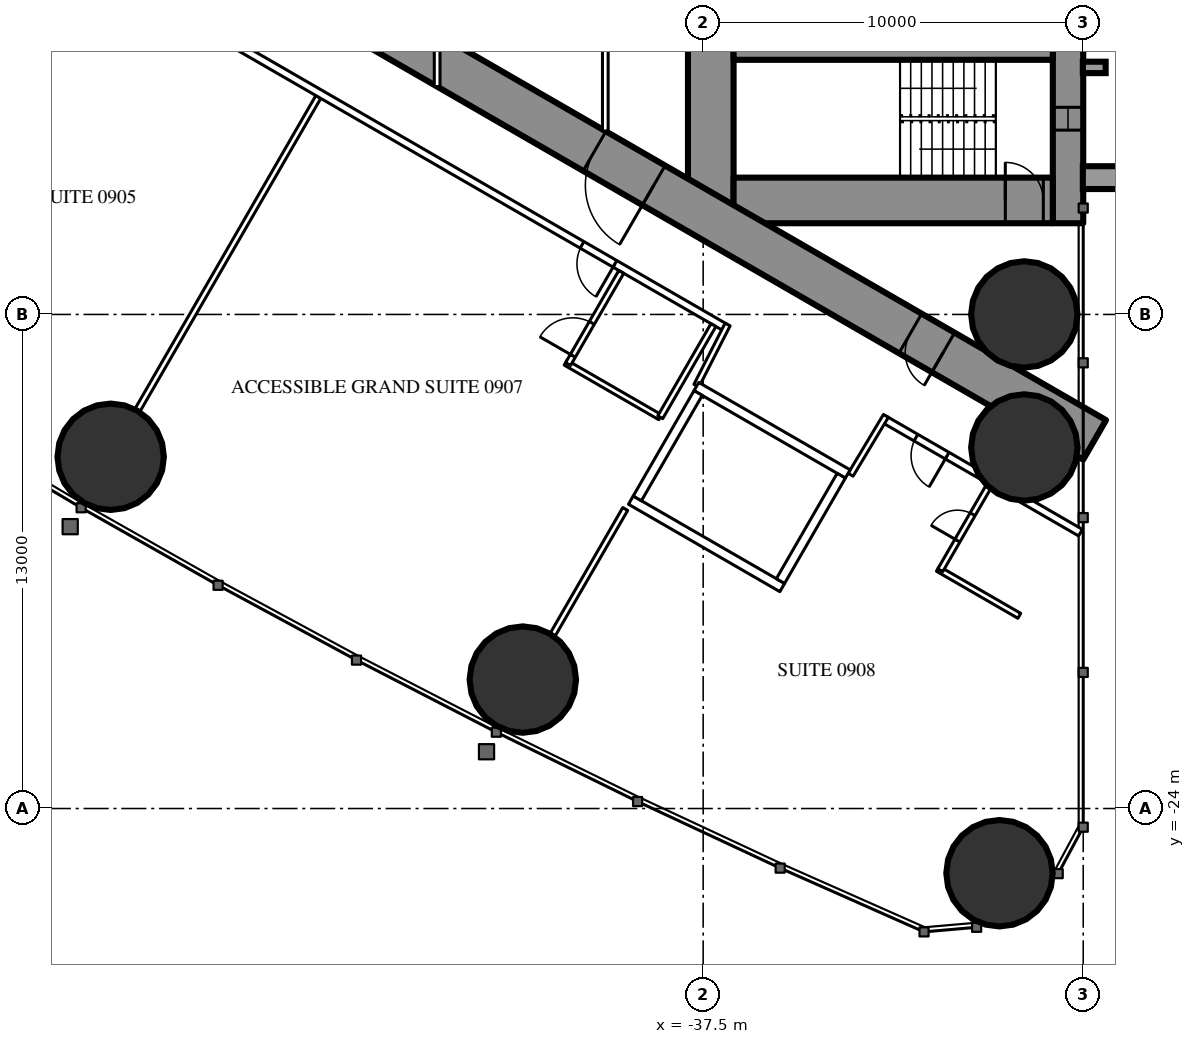
"""IFC4 building model, lengths in metres.
Left out: names, types, materials, properties, quantities, classifications, styles, units other than length and angle.
Written with IfcOpenShell. Run it as: python <this file> out.ifc"""

import sys

from ifc_helpers import new_model, si_unit, direction, frame, frame_2d, origin, origin_2d, place, context, subcontext, project, spatial, rectangle, hollow_circle, extrude, element, fill, save


model = new_model("IFC4")
c1 = context("Model", 3, precision=1e-05, world=origin(), true_north=direction((0.0, 1.0)))
c2 = subcontext(c1, "Body", "Model", "MODEL_VIEW")
j1 = project(units=[si_unit("LENGTHUNIT", "METRE"), si_unit("PLANEANGLEUNIT", "RADIAN")], contexts=[c1])
p1 = place(None, origin())
s1 = spatial("IfcSite", under=j1, at=p1, CompositionType="ELEMENT")
p2 = place(p1, origin())
s2 = spatial("IfcBuilding", under=s1, at=p2, CompositionType="ELEMENT")
p3 = place(p2, frame((0.0, 0.0, 39.0)))
s3 = spatial("IfcBuildingStorey", under=s2, at=p3, CompositionType="ELEMENT", Elevation=39.0)
for number, where, z_axis, x_axis in (
    (1, (-29.703, -25.703, 0.0), (0.0, 0.0, 1.0), (1.0, 0.0, 0.0)),
    (2, (-29.05, -11.0, 0.0), (0.0, 0.0, 1.0), (1.0, 0.0, 0.0)),
    (3, (-29.05, -14.5, 0.0), (0.0, 0.0, 1.0), (1.0, 0.0, 0.0)),
    (4, (-53.09, -14.745, 0.0), (0.0, 0.0, 1.0), (1.0, 0.0, 0.0)),
    (5, (-42.245, -20.607, 0.0), (0.0, 0.0, 1.0), (1.0, 0.0, 0.0)),
):
    element("IfcColumn", number, at=place(p3, frame(where, z_axis=z_axis, x_axis=x_axis)), inside=s3, PredefinedType="COLUMN", context=c2, shape_type="SweptSolid", body=[
        extrude(hollow_circle(Radius=1.4, WallThickness=0.12, at=origin_2d()), origin(), (0.0, 0.0, 1.0), 3.5),
    ])
p4 = place(p3, frame((-27.9, 8.6, 0.0), z_axis=(0.0, 0.0, 1.0), x_axis=(0.0, -1.0, 0.0)))
e6 = element("IfcWall", 6, at=p4, inside=s3, PredefinedType="SHEAR", context=c2, shape_type="SweptSolid", body=[
    extrude(rectangle(XDim=17.2, YDim=0.8, at=frame_2d((8.6, 0.0))), origin(), (0.0, 0.0, 1.0), 3.5),
])
p5 = place(p4, frame((2.45, 0.0, 0.6)))
e7 = element("IfcOpeningElement", 7, at=p5, cuts=e6, PredefinedType="OPENING", context=c2, shape_type="SweptSolid", body=[
    extrude(rectangle(XDim=0.6, YDim=2.1, at=frame_2d((0.3, 1.05))), frame((0.0, 0.41, 0.0), z_axis=(0.0, -1.0, 0.0), x_axis=(1.0, 0.0, 0.0)), (0.0, 0.0, 1.0), 0.82),
])
p6 = place(p4, frame((14.15, 0.0, 0.6)))
e8 = element("IfcOpeningElement", 8, at=p6, cuts=e6, PredefinedType="OPENING", context=c2, shape_type="SweptSolid", body=[
    extrude(rectangle(XDim=0.6, YDim=2.1, at=frame_2d((0.3, 1.05))), frame((0.0, 0.41, 0.0), z_axis=(0.0, -1.0, 0.0), x_axis=(1.0, 0.0, 0.0)), (0.0, 0.0, 1.0), 0.82),
])
p7 = place(p3, frame((-37.3, 8.6, 0.0), z_axis=(0.0, 0.0, 1.0), x_axis=(0.0, -1.0, 0.0)))
e9 = element("IfcWall", 9, at=p7, inside=s3, PredefinedType="SHEAR", context=c2, shape_type="SweptSolid", body=[
    extrude(rectangle(XDim=17.2, YDim=1.2, at=frame_2d((8.6, 0.0))), origin(), (0.0, 0.0, 1.0), 3.5),
])
p8 = place(p7, frame((7.7, 0.0, 0.0)))
e10 = element("IfcOpeningElement", 10, at=p8, cuts=e9, PredefinedType="OPENING", context=c2, shape_type="SweptSolid", body=[
    extrude(rectangle(XDim=1.8, YDim=2.2, at=frame_2d((0.9, 1.1))), frame((0.0, 0.61, 0.0), z_axis=(0.0, -1.0, 0.0), x_axis=(1.0, 0.0, 0.0)), (0.0, 0.0, 1.0), 1.22),
])
p9 = place(p3, frame((-28.3, -8.0, 0.0), z_axis=(0.0, 0.0, 1.0), x_axis=(-1.0, 0.0, 0.0)))
e11 = element("IfcWall", 11, at=p9, inside=s3, PredefinedType="SHEAR", context=c2, shape_type="SweptSolid", body=[
    extrude(rectangle(XDim=8.4, YDim=1.2, at=frame_2d((4.2, 0.0))), origin(), (0.0, 0.0, 1.0), 3.5),
])
p10 = place(p9, frame((0.25, 0.0, 0.0)))
e12 = element("IfcOpeningElement", 12, at=p10, cuts=e11, PredefinedType="OPENING", context=c2, shape_type="SweptSolid", body=[
    extrude(rectangle(XDim=1.0, YDim=2.2, at=frame_2d((0.5, 1.1))), frame((0.0, 0.61, 0.0), z_axis=(0.0, -1.0, 0.0), x_axis=(1.0, 0.0, 0.0)), (0.0, 0.0, 1.0), 1.22),
])
p11 = place(p3, frame((-28.3, -4.15, 0.0), z_axis=(0.0, 0.0, 1.0), x_axis=(-1.0, 0.0, 0.0)))
e13 = element("IfcWall", 13, at=p11, inside=s3, PredefinedType="SHEAR", context=c2, shape_type="SweptSolid", body=[
    extrude(rectangle(XDim=8.4, YDim=0.3, at=frame_2d((4.2, 0.0))), origin(), (0.0, 0.0, 1.0), 3.5),
])
p12 = place(p3, frame((-27.2, -14.3, 0.0), z_axis=(0.0, 0.0, 1.0), x_axis=(-0.866024021859, 0.500002393557, 0.0)))
e14 = element("IfcWall", 14, at=p12, inside=s3, PredefinedType="SHEAR", context=c2, shape_type="SweptSolid", body=[
    extrude(rectangle(XDim=27.907, YDim=1.2, at=frame_2d((13.954, 0.0))), origin(), (0.0, 0.0, 1.0), 3.5),
])
p13 = place(p12, frame((4.6, 0.0, 0.0)))
e15 = element("IfcOpeningElement", 15, at=p13, cuts=e14, PredefinedType="OPENING", context=c2, shape_type="SweptSolid", body=[
    extrude(rectangle(XDim=1.0, YDim=2.2, at=frame_2d((0.5, 1.1))), frame((0.0, 0.61, 0.0), z_axis=(0.0, -1.0, 0.0), x_axis=(1.0, 0.0, 0.0)), (0.0, 0.0, 1.0), 1.22),
])
p14 = place(p12, frame((13.395, 0.0, 0.0)))
e16 = element("IfcOpeningElement", 16, at=p14, cuts=e14, PredefinedType="OPENING", context=c2, shape_type="SweptSolid", body=[
    extrude(rectangle(XDim=1.8, YDim=2.2, at=frame_2d((0.9, 1.1))), frame((0.0, 0.61, 0.0), z_axis=(0.0, -1.0, 0.0), x_axis=(1.0, 0.0, 0.0)), (0.0, 0.0, 1.0), 1.22),
])
p15 = place(p3, frame((-47.627, -5.278, 0.0), z_axis=(0.0, 0.0, 1.0), x_axis=(-0.500009844318, -0.86601972009, 0.0)))
e17 = element("IfcWall", 17, at=p15, inside=s3, PredefinedType="PARTITIONING", context=c2, shape_type="SweptSolid", body=[
    extrude(rectangle(XDim=9.51, YDim=0.15, at=frame_2d((4.755, 0.0))), origin(), (0.0, 0.0, 1.0), 2.25),
])
p16 = place(p3, frame((-39.551, -16.118, 0.0), z_axis=(0.0, 0.0, 1.0), x_axis=(-0.499986503906, -0.866033195618, 0.0)))
e18 = element("IfcWall", 18, at=p16, inside=s3, PredefinedType="PARTITIONING", context=c2, shape_type="SweptSolid", body=[
    extrude(rectangle(XDim=3.815, YDim=0.15, at=frame_2d((1.907, 0.0))), origin(), (0.0, 0.0, 1.0), 3.25),
])
p17 = place(p3, frame((-27.572, -16.741, 0.0), z_axis=(0.0, 0.0, 1.0), x_axis=(-0.866024464444, 0.500001626982, 0.0)))
e19 = element("IfcWall", 19, at=p17, inside=s3, PredefinedType="PARTITIONING", context=c2, shape_type="SweptSolid", body=[
    extrude(rectangle(XDim=5.955, YDim=0.2, at=frame_2d((2.978, 0.0))), origin(), (0.0, 0.0, 1.0), 3.25),
])
p18 = place(p17, frame((4.05, 0.0, 0.0)))
e20 = element("IfcOpeningElement", 20, at=p18, cuts=e19, PredefinedType="OPENING", context=c2, shape_type="SweptSolid", body=[
    extrude(rectangle(XDim=0.95, YDim=2.2, at=frame_2d((0.475, 1.1))), frame((0.0, 0.11, 0.0), z_axis=(0.0, -1.0, 0.0), x_axis=(1.0, 0.0, 0.0)), (0.0, 0.0, 1.0), 0.22),
])
p19 = place(p3, frame((-36.92, -11.344, 0.0), z_axis=(0.0, 0.0, 1.0), x_axis=(-0.866028313256, 0.499994960614, 0.0)))
e21 = element("IfcWall", 21, at=p19, inside=s3, PredefinedType="PARTITIONING", context=c2, shape_type="SweptSolid", body=[
    extrude(rectangle(XDim=22.568, YDim=0.2, at=frame_2d((11.284, 0.0))), origin(), (0.0, 0.0, 1.0), 3.25),
])
p20 = place(p19, frame((21.018, 0.0, 0.0)))
e22 = element("IfcOpeningElement", 22, at=p20, cuts=e21, PredefinedType="OPENING", context=c2, shape_type="SweptSolid", body=[
    extrude(rectangle(XDim=0.95, YDim=2.2, at=frame_2d((0.475, 1.1))), frame((0.0, 0.11, 0.0), z_axis=(0.0, -1.0, 0.0), x_axis=(1.0, 0.0, 0.0)), (0.0, 0.0, 1.0), 0.22),
])
p21 = place(p19, frame((3.35, 0.0, 0.0)))
e23 = element("IfcOpeningElement", 23, at=p21, cuts=e21, PredefinedType="OPENING", context=c2, shape_type="SweptSolid", body=[
    extrude(rectangle(XDim=1.0, YDim=2.2, at=frame_2d((0.5, 1.1))), frame((0.0, 0.11, 0.0), z_axis=(0.0, -1.0, 0.0), x_axis=(1.0, 0.0, 0.0)), (0.0, 0.0, 1.0), 0.22),
])
p22 = place(p3, frame((-36.857, -11.265, 0.0), z_axis=(0.0, 0.0, 1.0), x_axis=(-0.454225294761, -0.890886851176, 0.0)))
e24 = element("IfcWall", 24, at=p22, inside=s3, PredefinedType="PARTITIONING", context=c2, shape_type="SweptSolid", body=[
    extrude(rectangle(XDim=1.807, YDim=0.15, at=frame_2d((0.904, 0.0))), origin(), (0.0, 0.0, 1.0), 3.25),
])
p23 = place(p3, frame((-33.621, -15.218, 0.0), z_axis=(0.0, 0.0, 1.0), x_axis=(0.514336634837, 0.857588377991, 0.0)))
e25 = element("IfcWall", 25, at=p23, inside=s3, PredefinedType="PARTITIONING", context=c2, shape_type="SweptSolid", body=[
    extrude(rectangle(XDim=1.805, YDim=0.15, at=frame_2d((0.903, 0.0))), origin(), (0.0, 0.0, 1.0), 3.25),
])
p24 = place(p3, frame((-38.63, -13.705, 0.0), z_axis=(0.0, 0.0, 1.0), x_axis=(-0.866018712932, 0.500011588718, 0.0)))
e26 = element("IfcWall", 26, at=p24, inside=s3, PredefinedType="PARTITIONING", context=c2, shape_type="SweptSolid", body=[
    extrude(rectangle(XDim=2.875, YDim=0.15, at=frame_2d((1.438, 0.0))), origin(), (0.0, 0.0, 1.0), 3.25),
])
p25 = place(p3, frame((-39.655, -9.88, 0.0), z_axis=(0.0, 0.0, 1.0), x_axis=(-0.500049511043, -0.865996816683, 0.0)))
e27 = element("IfcWall", 27, at=p25, inside=s3, PredefinedType="PARTITIONING", context=c2, shape_type="SweptSolid", body=[
    extrude(rectangle(XDim=2.8, YDim=0.15, at=frame_2d((1.4, 0.0))), origin(), (0.0, 0.0, 1.0), 3.25),
])
p26 = place(p25, frame((1.55, 0.0, 0.0)))
e28 = element("IfcOpeningElement", 28, at=p26, cuts=e27, PredefinedType="OPENING", context=c2, shape_type="SweptSolid", body=[
    extrude(rectangle(XDim=1.0, YDim=2.2, at=frame_2d((0.5, 1.1))), frame((0.0, 0.085, 0.0), z_axis=(0.0, -1.0, 0.0), x_axis=(1.0, 0.0, 0.0)), (0.0, 0.0, 1.0), 0.17),
])
p27 = place(p3, frame((-37.23, -11.281, 0.0), z_axis=(0.0, 0.0, 1.0), x_axis=(-0.500049511043, -0.865996816683, 0.0)))
e29 = element("IfcWall", 29, at=p27, inside=s3, PredefinedType="PARTITIONING", context=c2, shape_type="SweptSolid", body=[
    extrude(rectangle(XDim=2.8, YDim=0.15, at=frame_2d((1.4, 0.0))), origin(), (0.0, 0.0, 1.0), 3.25),
])
p28 = place(p3, frame((-29.182, -18.929, 0.0), z_axis=(0.0, 0.0, 1.0), x_axis=(-0.866006523861, 0.500032699561, 0.0)))
e30 = element("IfcWall", 30, at=p28, inside=s3, PredefinedType="PARTITIONING", context=c2, shape_type="SweptSolid", body=[
    extrude(rectangle(XDim=2.475, YDim=0.15, at=frame_2d((1.237, 0.0))), origin(), (0.0, 0.0, 1.0), 3.25),
])
p29 = place(p3, frame((-29.96, -15.478, 0.0), z_axis=(0.0, 0.0, 1.0), x_axis=(-0.500006934395, -0.866021400173, 0.0)))
e31 = element("IfcWall", 31, at=p29, inside=s3, PredefinedType="PARTITIONING", context=c2, shape_type="SweptSolid", body=[
    extrude(rectangle(XDim=2.6, YDim=0.15, at=frame_2d((1.3, 0.0))), origin(), (0.0, 0.0, 1.0), 3.25),
])
p30 = place(p29, frame((0.9, 0.0, 0.0)))
e32 = element("IfcOpeningElement", 32, at=p30, cuts=e31, PredefinedType="OPENING", context=c2, shape_type="SweptSolid", body=[
    extrude(rectangle(XDim=0.8, YDim=2.2, at=frame_2d((0.4, 1.1))), frame((0.0, 0.085, 0.0), z_axis=(0.0, -1.0, 0.0), x_axis=(1.0, 0.0, 0.0)), (0.0, 0.0, 1.0), 0.17),
])
p31 = place(p3, frame((-40.075, 1.2, 0.0), z_axis=(0.0, 0.0, 1.0), x_axis=(0.0, -1.0, 0.0)))
e33 = element("IfcWall", 33, at=p31, inside=s3, PredefinedType="PARTITIONING", context=c2, shape_type="SweptSolid", body=[
    extrude(rectangle(XDim=7.374, YDim=0.15, at=frame_2d((3.687, 0.0))), origin(), (0.0, 0.0, 1.0), 3.25),
])
p32 = place(p31, frame((2.787, 0.0, 0.0)))
e34 = element("IfcOpeningElement", 34, at=p32, cuts=e33, PredefinedType="OPENING", context=c2, shape_type="SweptSolid", body=[
    extrude(rectangle(XDim=1.8, YDim=2.2, at=frame_2d((0.9, 1.1))), frame((0.0, 0.085, 0.0), z_axis=(0.0, -1.0, 0.0), x_axis=(1.0, 0.0, 0.0)), (0.0, 0.0, 1.0), 0.17),
])
p33 = place(p3, frame((-44.5, 5.005, 0.0), z_axis=(0.0, 0.0, 1.0), x_axis=(0.0, -1.0, 0.0)))
e35 = element("IfcWall", 35, at=p33, inside=s3, PredefinedType="PARTITIONING", context=c2, shape_type="SweptSolid", body=[
    extrude(rectangle(XDim=10.009, YDim=0.15, at=frame_2d((5.005, 0.0))), origin(), (0.0, 0.0, 1.0), 2.45),
])
p34 = place(p33, frame((4.505, 0.0, 0.0)))
e36 = element("IfcOpeningElement", 36, at=p34, cuts=e35, PredefinedType="OPENING", context=c2, shape_type="SweptSolid", body=[
    extrude(rectangle(XDim=1.0, YDim=2.2, at=frame_2d((0.5, 1.1))), frame((0.0, 0.085, 0.0), z_axis=(0.0, -1.0, 0.0), x_axis=(1.0, 0.0, 0.0)), (0.0, 0.0, 1.0), 0.17),
])
p35 = place(p3, frame((-33.696, -15.197, 0.0), z_axis=(0.0, 0.0, 1.0), x_axis=(-0.865976953817, 0.500083908417, 0.0)))
e37 = element("IfcWall", 37, at=p35, inside=s3, PredefinedType="PARTITIONING", context=c2, shape_type="SweptSolid", body=[
    extrude(rectangle(XDim=4.599, YDim=0.25, at=frame_2d((2.3, 0.0))), origin(), (0.0, 0.0, 1.0), 3.25),
])
p36 = place(p3, frame((-35.42, -18.186, 0.0), z_axis=(0.0, 0.0, 1.0), x_axis=(-0.865990227814, 0.50006092162, 0.0)))
e38 = element("IfcWall", 38, at=p36, inside=s3, PredefinedType="PARTITIONING", context=c2, shape_type="SweptSolid", body=[
    extrude(rectangle(XDim=4.6, YDim=0.25, at=frame_2d((2.3, 0.0))), origin(), (0.0, 0.0, 1.0), 3.25),
])
p37 = place(p3, frame((-33.866, -15.243, 0.0), z_axis=(0.0, 0.0, 1.0), x_axis=(-0.499929347863, -0.866066190972, 0.0)))
e39 = element("IfcWall", 39, at=p37, inside=s3, PredefinedType="PARTITIONING", context=c2, shape_type="SweptSolid", body=[
    extrude(rectangle(XDim=3.201, YDim=0.25, at=frame_2d((1.6, 0.0))), origin(), (0.0, 0.0, 1.0), 3.25),
])
p38 = place(p3, frame((-37.633, -13.068, 0.0), z_axis=(0.0, 0.0, 1.0), x_axis=(-0.499872130319, -0.866099216793, 0.0)))
e40 = element("IfcWall", 40, at=p38, inside=s3, PredefinedType="PARTITIONING", context=c2, shape_type="SweptSolid", body=[
    extrude(rectangle(XDim=3.2, YDim=0.25, at=frame_2d((1.6, 0.0))), origin(), (0.0, 0.0, 1.0), 3.25),
])
p39 = place(p26, origin())
e41 = element("IfcDoor", 41, at=p39, inside=s3, OperationType="SINGLE_SWING_RIGHT", PredefinedType="DOOR", context=c2, shape_type="SweptSolid", body=[
    extrude(rectangle(XDim=1.0, YDim=2.2, at=frame_2d((0.5, 1.1))), frame((0.0, 0.025, 0.0), z_axis=(0.0, -1.0, 0.0), x_axis=(1.0, 0.0, 0.0)), (0.0, 0.0, 1.0), 0.05),
])
fill(e28, e41)
p40 = place(p21, origin())
e42 = element("IfcDoor", 42, at=p40, inside=s3, OperationType="SINGLE_SWING_LEFT", PredefinedType="DOOR", context=c2, shape_type="SweptSolid", body=[
    extrude(rectangle(XDim=1.0, YDim=2.2, at=frame_2d((0.5, 1.1))), frame((0.0, 0.025, 0.0), z_axis=(0.0, -1.0, 0.0), x_axis=(1.0, 0.0, 0.0)), (0.0, 0.0, 1.0), 0.05),
])
fill(e23, e42)
p41 = place(p30, origin())
e43 = element("IfcDoor", 43, at=p41, inside=s3, OperationType="SINGLE_SWING_RIGHT", PredefinedType="DOOR", context=c2, shape_type="SweptSolid", body=[
    extrude(rectangle(XDim=0.8, YDim=2.2, at=frame_2d((0.4, 1.1))), frame((0.0, 0.025, 0.0), z_axis=(0.0, -1.0, 0.0), x_axis=(1.0, 0.0, 0.0)), (0.0, 0.0, 1.0), 0.05),
])
fill(e32, e43)
p42 = place(p18, origin())
e44 = element("IfcDoor", 44, at=p42, inside=s3, OperationType="SINGLE_SWING_LEFT", PredefinedType="DOOR", context=c2, shape_type="SweptSolid", body=[
    extrude(rectangle(XDim=0.95, YDim=2.2, at=frame_2d((0.475, 1.1))), frame((0.0, 0.025, 0.0), z_axis=(0.0, -1.0, 0.0), x_axis=(1.0, 0.0, 0.0)), (0.0, 0.0, 1.0), 0.05),
])
fill(e20, e44)
p43 = place(p13, origin())
e45 = element("IfcDoor", 45, at=p43, inside=s3, OperationType="SINGLE_SWING_LEFT", PredefinedType="DOOR", context=c2, shape_type="SweptSolid", body=[
    extrude(rectangle(XDim=1.0, YDim=2.2, at=frame_2d((0.5, 1.1))), frame((0.0, 0.025, 0.0), z_axis=(0.0, -1.0, 0.0), x_axis=(1.0, 0.0, 0.0)), (0.0, 0.0, 1.0), 0.05),
])
fill(e15, e45)
p44 = place(p14, origin())
e46 = element("IfcDoor", 46, at=p44, inside=s3, OperationType="DOUBLE_DOOR_SINGLE_SWING", PredefinedType="DOOR", context=c2, shape_type="SweptSolid", body=[
    extrude(rectangle(XDim=1.8, YDim=2.2, at=frame_2d((0.9, 1.1))), frame((0.0, 0.025, 0.0), z_axis=(0.0, -1.0, 0.0), x_axis=(1.0, 0.0, 0.0)), (0.0, 0.0, 1.0), 0.05),
])
fill(e16, e46)
p45 = place(p10, origin())
e47 = element("IfcDoor", 47, at=p45, inside=s3, OperationType="SINGLE_SWING_RIGHT", PredefinedType="DOOR", context=c2, shape_type="SweptSolid", body=[
    extrude(rectangle(XDim=1.0, YDim=2.2, at=frame_2d((0.5, 1.1))), frame((0.0, 0.025, 0.0), z_axis=(0.0, -1.0, 0.0), x_axis=(1.0, 0.0, 0.0)), (0.0, 0.0, 1.0), 0.05),
])
fill(e12, e47)
p46 = place(p6, origin())
e48 = element("IfcWindow", 48, at=p46, inside=s3, PartitioningType="SINGLE_PANEL", PredefinedType="WINDOW", context=c2, shape_type="SweptSolid", body=[
    extrude(rectangle(XDim=0.6, YDim=2.1, at=frame_2d((0.3, 1.05))), frame((0.0, 0.03, 0.0), z_axis=(0.0, -1.0, 0.0), x_axis=(1.0, 0.0, 0.0)), (0.0, 0.0, 1.0), 0.06),
])
fill(e8, e48)
save(model, sys.argv[1])
